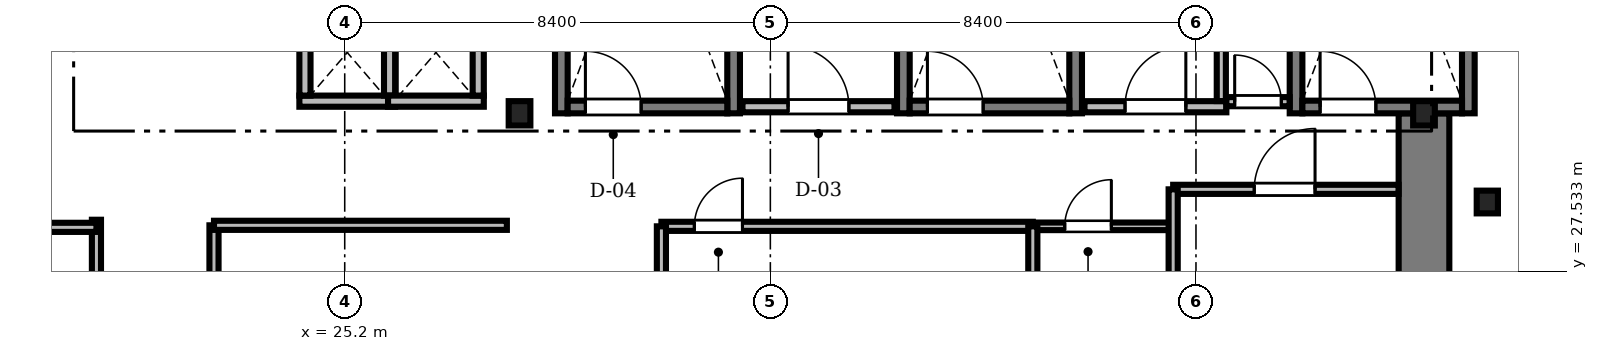
"""IFC4 building model, lengths in metres.
Left out: names, types, materials, properties, quantities, classifications, styles, units other than length and angle.
Written with IfcOpenShell. Run it as: python <this file> out.ifc"""

import sys

from ifc_helpers import new_model, si_unit, direction, frame, frame_2d, origin, origin_2d, place, context, subcontext, project, spatial, rectangle, i_section, extrude, source, transform, mapped, element, fill, save


model = new_model("IFC4")
c1 = context("Model", 3, precision=1e-05, world=origin(), true_north=direction((0.0, 1.0)))
c2 = subcontext(c1, "Body", "Model", "MODEL_VIEW")
j1 = project(units=[si_unit("LENGTHUNIT", "METRE"), si_unit("PLANEANGLEUNIT", "RADIAN")], contexts=[c1])
p1 = place(None, origin())
s1 = spatial("IfcSite", under=j1, at=p1, CompositionType="ELEMENT")
p2 = place(p1, origin())
s2 = spatial("IfcBuilding", under=s1, at=p2, CompositionType="ELEMENT")
p3 = place(p2, frame((0.0, 0.0, 71.4)))
s3 = spatial("IfcBuildingStorey", under=s2, at=p3, CompositionType="ELEMENT", Elevation=71.4)
m1 = source(origin(), c2, "Body", "SweptSolid", [
    extrude(rectangle(XDim=13.15, YDim=1.0, at=frame_2d((6.575, 0.0))), origin(), (0.0, 0.0, 1.0), 3.41),
])
p4 = place(p3, frame((46.5, 17.5, 0.0), z_axis=(0.0, 0.0, 1.0), x_axis=(0.0, 1.0, 0.0)))
e1 = element("IfcWall", 1, at=p4, inside=s3, PredefinedType="SHEAR", context=c2, shape_type="MappedRepresentation", body=[
    mapped(m1, transform((0.0, 0.0, 0.0), scale=1.0)),
])
m2 = source(origin(), c2, "Body", "SweptSolid", [
    extrude(i_section(OverallWidth=0.428, OverallDepth=0.481, WebThickness=0.04, FlangeThickness=0.063, FilletRadius=0.015, at=origin_2d()), origin(), (0.0, 0.0, 1.0), 3.41),
])
for number, where, z_axis, x_axis in (
    (2, (28.65, 30.65, 0.0), (0.0, 0.0, 1.0), (1.0, 0.0, 0.0)),
    (3, (46.5, 30.65, 0.0), (0.0, 0.0, 1.0), (1.0, 0.0, 0.0)),
):
    element("IfcColumn", number, at=place(p3, frame(where, z_axis=z_axis, x_axis=x_axis)), inside=s3, PredefinedType="COLUMN", context=c2, shape_type="MappedRepresentation", body=[
        mapped(m2, transform((0.0, 0.0, 0.0), scale=1.0)),
    ])
m3 = source(origin(), c2, "Body", "SweptSolid", [
    extrude(i_section(OverallWidth=0.419, OverallDepth=0.449, WebThickness=0.031, FlangeThickness=0.048, FilletRadius=0.015, at=origin_2d()), origin(), (0.0, 0.0, 1.0), 3.41),
])
p5 = place(p3, frame((47.75, 28.9, 0.0), z_axis=(0.0, 0.0, 1.0), x_axis=(1.0, 0.0, 0.0)))
e4 = element("IfcColumn", 4, at=p5, inside=s3, PredefinedType="COLUMN", context=c2, shape_type="MappedRepresentation", body=[
    mapped(m3, transform((0.0, 0.0, 0.0), scale=1.0)),
])
m4 = source(origin(), c2, "Body", "SweptSolid", [
    extrude(rectangle(XDim=9.15, YDim=0.25, at=frame_2d((4.575, 0.0))), origin(), (0.0, 0.0, 1.0), 3.45),
])
for number, where, z_axis, x_axis in (
    (5, (29.475, 30.65, 0.0), (0.0, 0.0, 1.0), (0.0, 1.0, 0.0)),
    (6, (32.875, 30.65, 0.0), (0.0, 0.0, 1.0), (0.0, 1.0, 0.0)),
):
    element("IfcWall", number, at=place(p3, frame(where, z_axis=z_axis, x_axis=x_axis)), inside=s3, PredefinedType="SOLIDWALL", context=c2, shape_type="MappedRepresentation", body=[
        mapped(m4, transform((0.0, 0.0, 0.0), scale=1.0)),
    ])
m5 = source(origin(), c2, "Body", "SweptSolid", [
    extrude(rectangle(XDim=3.15, YDim=0.25, at=frame_2d((1.575, 0.0))), origin(), (0.0, 0.0, 1.0), 3.45),
])
p6 = place(p3, frame((29.6, 30.775, 0.0), z_axis=(0.0, 0.0, 1.0), x_axis=(1.0, 0.0, 0.0)))
e7 = element("IfcWall", 7, at=p6, inside=s3, PredefinedType="SOLIDWALL", context=c2, shape_type="MappedRepresentation", body=[
    mapped(m5, transform((0.0, 0.0, 0.0), scale=1.0)),
])
m6 = source(origin(), c2, "Body", "SweptSolid", [
    extrude(rectangle(XDim=1.1, YDim=2.2, at=frame_2d((0.55, 1.1))), frame((0.0, 0.135, 0.0), z_axis=(0.0, -1.0, 0.0), x_axis=(1.0, 0.0, 0.0)), (0.0, 0.0, 1.0), 0.27),
])
p7 = place(p6, frame((0.35, 0.0, 0.0)))
e8 = element("IfcOpeningElement", 8, at=p7, cuts=e7, PredefinedType="OPENING", context=c2, shape_type="MappedRepresentation", body=[
    mapped(m6, transform((0.0, 0.0, 0.0), scale=1.0)),
])
for number, where, z_axis, x_axis in (
    (9, (36.225, 30.65, 0.0), (0.0, 0.0, 1.0), (0.0, 1.0, 0.0)),
    (10, (39.625, 30.65, 0.0), (0.0, 0.0, 1.0), (0.0, 1.0, 0.0)),
):
    element("IfcWall", number, at=place(p3, frame(where, z_axis=z_axis, x_axis=x_axis)), inside=s3, PredefinedType="SOLIDWALL", context=c2, shape_type="MappedRepresentation", body=[
        mapped(m4, transform((0.0, 0.0, 0.0), scale=1.0)),
    ])
p8 = place(p3, frame((36.35, 30.775, 0.0), z_axis=(0.0, 0.0, 1.0), x_axis=(1.0, 0.0, 0.0)))
e11 = element("IfcWall", 11, at=p8, inside=s3, PredefinedType="SOLIDWALL", context=c2, shape_type="MappedRepresentation", body=[
    mapped(m5, transform((0.0, 0.0, 0.0), scale=1.0)),
])
p9 = place(p8, frame((0.35, 0.0, 0.0)))
e12 = element("IfcOpeningElement", 12, at=p9, cuts=e11, PredefinedType="OPENING", context=c2, shape_type="MappedRepresentation", body=[
    mapped(m6, transform((0.0, 0.0, 0.0), scale=1.0)),
])
for number, where, z_axis, x_axis in (
    (13, (43.975, 30.65, 0.0), (0.0, 0.0, 1.0), (0.0, 1.0, 0.0)),
    (14, (47.375, 30.65, 0.0), (0.0, 0.0, 1.0), (0.0, 1.0, 0.0)),
):
    element("IfcWall", number, at=place(p3, frame(where, z_axis=z_axis, x_axis=x_axis)), inside=s3, PredefinedType="SOLIDWALL", context=c2, shape_type="MappedRepresentation", body=[
        mapped(m4, transform((0.0, 0.0, 0.0), scale=1.0)),
    ])
p10 = place(p3, frame((44.1, 30.775, 0.0), z_axis=(0.0, 0.0, 1.0), x_axis=(1.0, 0.0, 0.0)))
e15 = element("IfcWall", 15, at=p10, inside=s3, PredefinedType="SOLIDWALL", context=c2, shape_type="MappedRepresentation", body=[
    mapped(m5, transform((0.0, 0.0, 0.0), scale=1.0)),
])
p11 = place(p10, frame((0.35, 0.0, 0.0)))
e16 = element("IfcOpeningElement", 16, at=p11, cuts=e15, PredefinedType="OPENING", context=c2, shape_type="MappedRepresentation", body=[
    mapped(m6, transform((0.0, 0.0, 0.0), scale=1.0)),
])
m7 = source(origin(), c2, "Body", "SweptSolid", [
    extrude(rectangle(XDim=3.0, YDim=0.22, at=frame_2d((1.5, 0.0))), origin(), (0.0, 0.0, 1.0), 3.41),
])
p12 = place(p3, frame((33.05, 30.78, 0.0), z_axis=(0.0, 0.0, 1.0), x_axis=(1.0, 0.0, 0.0)))
e17 = element("IfcWall", 17, at=p12, inside=s3, PredefinedType="SOLIDWALL", context=c2, shape_type="MappedRepresentation", body=[
    mapped(m7, transform((0.0, 0.0, 0.0), scale=1.0)),
])
m8 = source(origin(), c2, "Body", "SweptSolid", [
    extrude(rectangle(XDim=1.2, YDim=2.2, at=frame_2d((0.6, 1.1))), frame((0.0, 0.12, 0.0), z_axis=(0.0, -1.0, 0.0), x_axis=(1.0, 0.0, 0.0)), (0.0, 0.0, 1.0), 0.24),
])
p13 = place(p12, frame((0.9, 0.0, 0.0)))
e18 = element("IfcOpeningElement", 18, at=p13, cuts=e17, PredefinedType="OPENING", context=c2, shape_type="MappedRepresentation", body=[
    mapped(m8, transform((0.0, 0.0, 0.0), scale=1.0)),
])
m9 = source(origin(), c2, "Body", "SweptSolid", [
    extrude(rectangle(XDim=2.8, YDim=0.22, at=frame_2d((1.4, 0.0))), origin(), (0.0, 0.0, 1.0), 3.41),
])
p14 = place(p3, frame((39.8, 30.78, 0.0), z_axis=(0.0, 0.0, 1.0), x_axis=(1.0, 0.0, 0.0)))
e19 = element("IfcWall", 19, at=p14, inside=s3, PredefinedType="SOLIDWALL", context=c2, shape_type="MappedRepresentation", body=[
    mapped(m9, transform((0.0, 0.0, 0.0), scale=1.0)),
])
p15 = place(p14, frame((0.8, 0.0, 0.0)))
e20 = element("IfcOpeningElement", 20, at=p15, cuts=e19, PredefinedType="OPENING", context=c2, shape_type="MappedRepresentation", body=[
    mapped(m8, transform((0.0, 0.0, 0.0), scale=1.0)),
])
m10 = source(origin(), c2, "Body", "SweptSolid", [
    extrude(rectangle(XDim=1.89, YDim=0.22, at=frame_2d((0.945, 0.0))), origin(), (0.0, 0.0, 1.0), 3.41),
])
p16 = place(p3, frame((24.305, 30.89, 0.0), z_axis=(0.0, 0.0, 1.0), x_axis=(1.0, 0.0, 0.0)))
e21 = element("IfcWall", 21, at=p16, inside=s3, PredefinedType="SOLIDWALL", context=c2, shape_type="MappedRepresentation", body=[
    mapped(m10, transform((0.0, 0.0, 0.0), scale=1.0)),
])
m11 = source(origin(), c2, "Body", "SweptSolid", [
    extrude(rectangle(XDim=1.7, YDim=0.22, at=frame_2d((0.85, 0.0))), origin(), (0.0, 0.0, 1.0), 3.41),
])
for number, where, z_axis, x_axis in (
    (22, (24.415, 31.0, 0.0), (0.0, 0.0, 1.0), (0.0, 1.0, 0.0)),
    (23, (26.085, 31.0, 0.0), (0.0, 0.0, 1.0), (0.0, 1.0, 0.0)),
):
    element("IfcWall", number, at=place(p3, frame(where, z_axis=z_axis, x_axis=x_axis)), inside=s3, PredefinedType="SOLIDWALL", context=c2, shape_type="MappedRepresentation", body=[
        mapped(m11, transform((0.0, 0.0, 0.0), scale=1.0)),
    ])
p17 = place(p3, frame((26.055, 30.89, 0.0), z_axis=(0.0, 0.0, 1.0), x_axis=(1.0, 0.0, 0.0)))
e24 = element("IfcWall", 24, at=p17, inside=s3, PredefinedType="SOLIDWALL", context=c2, shape_type="MappedRepresentation", body=[
    mapped(m10, transform((0.0, 0.0, 0.0), scale=1.0)),
])
p18 = place(p3, frame((27.835, 31.0, 0.0), z_axis=(0.0, 0.0, 1.0), x_axis=(0.0, 1.0, 0.0)))
e25 = element("IfcWall", 25, at=p18, inside=s3, PredefinedType="SOLIDWALL", context=c2, shape_type="MappedRepresentation", body=[
    mapped(m11, transform((0.0, 0.0, 0.0), scale=1.0)),
])
m12 = source(origin(), c2, "Body", "SweptSolid", [
    extrude(rectangle(XDim=13.84, YDim=0.18, at=frame_2d((6.92, 0.0))), origin(), (0.0, 0.0, 1.0), 2.802),
])
p19 = place(p3, frame((20.3, 14.71, 0.0), z_axis=(0.0, 0.0, 1.0), x_axis=(0.0, 1.0, 0.0)))
e26 = element("IfcWall", 26, at=p19, inside=s3, PredefinedType="PARTITIONING", context=c2, shape_type="MappedRepresentation", body=[
    mapped(m12, transform((0.0, 0.0, 0.0), scale=1.0)),
])
m13 = source(origin(), c2, "Body", "SweptSolid", [
    extrude(rectangle(XDim=1.05, YDim=2.2, at=frame_2d((0.525, 1.1))), frame((0.0, 0.1, 0.0), z_axis=(0.0, -1.0, 0.0), x_axis=(1.0, 0.0, 0.0)), (0.0, 0.0, 1.0), 0.2),
])
p20 = place(p19, frame((2.903, 0.0, 0.0)))
e27 = element("IfcOpeningElement", 27, at=p20, cuts=e26, PredefinedType="OPENING", context=c2, shape_type="MappedRepresentation", body=[
    mapped(m13, transform((0.0, 0.0, 0.0), scale=1.0)),
])
p21 = place(p19, frame((9.748, 0.0, 0.0)))
e28 = element("IfcOpeningElement", 28, at=p21, cuts=e26, PredefinedType="OPENING", context=c2, shape_type="MappedRepresentation", body=[
    mapped(m13, transform((0.0, 0.0, 0.0), scale=1.0)),
])
m14 = source(origin(), c2, "Body", "SweptSolid", [
    extrude(rectangle(XDim=11.94, YDim=0.18, at=frame_2d((5.97, 0.0))), origin(), (0.0, 0.0, 1.0), 2.802),
])
p22 = place(p3, frame((22.62, 16.5, 0.0), z_axis=(0.0, 0.0, 1.0), x_axis=(0.0, 1.0, 0.0)))
e29 = element("IfcWall", 29, at=p22, inside=s3, PredefinedType="PARTITIONING", context=c2, shape_type="MappedRepresentation", body=[
    mapped(m14, transform((0.0, 0.0, 0.0), scale=1.0)),
])
p23 = place(p22, frame((4.5, 0.0, 0.0)))
e30 = element("IfcOpeningElement", 30, at=p23, cuts=e29, PredefinedType="OPENING", context=c2, shape_type="MappedRepresentation", body=[
    mapped(m13, transform((0.0, 0.0, 0.0), scale=1.0)),
])
m15 = source(origin(), c2, "Body", "SweptSolid", [
    extrude(rectangle(XDim=7.33, YDim=0.18, at=frame_2d((3.665, 0.0))), origin(), (0.0, 0.0, 1.0), 3.042),
])
p24 = place(p3, frame((31.45, 28.42, 0.0), z_axis=(0.0, 0.0, 1.0), x_axis=(1.0, 0.0, 0.0)))
e31 = element("IfcWall", 31, at=p24, inside=s3, PredefinedType="PARTITIONING", context=c2, shape_type="MappedRepresentation", body=[
    mapped(m15, transform((0.0, 0.0, 0.0), scale=1.0)),
])
m16 = source(origin(), c2, "Body", "SweptSolid", [
    extrude(rectangle(XDim=0.95, YDim=2.15, at=frame_2d((0.475, 1.075))), frame((0.0, 0.1, 0.0), z_axis=(0.0, -1.0, 0.0), x_axis=(1.0, 0.0, 0.0)), (0.0, 0.0, 1.0), 0.2),
])
p25 = place(p24, frame((0.65, 0.0, 0.0)))
e32 = element("IfcOpeningElement", 32, at=p25, cuts=e31, PredefinedType="OPENING", context=c2, shape_type="MappedRepresentation", body=[
    mapped(m16, transform((0.0, 0.0, 0.0), scale=1.0)),
])
m17 = source(origin(), c2, "Body", "SweptSolid", [
    extrude(rectangle(XDim=4.448, YDim=0.18, at=frame_2d((2.224, 0.0))), origin(), (0.0, 0.0, 1.0), 3.042),
])
p26 = place(p3, frame((41.55, 29.15, 0.0), z_axis=(0.0, 0.0, 1.0), x_axis=(1.0, 0.0, 0.0)))
e33 = element("IfcWall", 33, at=p26, inside=s3, PredefinedType="PARTITIONING", context=c2, shape_type="MappedRepresentation", body=[
    mapped(m17, transform((0.0, 0.0, 0.0), scale=1.0)),
])
m18 = source(origin(), c2, "Body", "SweptSolid", [
    extrude(rectangle(XDim=1.2, YDim=2.2, at=frame_2d((0.6, 1.1))), frame((0.0, 0.1, 0.0), z_axis=(0.0, -1.0, 0.0), x_axis=(1.0, 0.0, 0.0)), (0.0, 0.0, 1.0), 0.2),
])
p27 = place(p26, frame((1.6, 0.0, 0.0)))
e34 = element("IfcOpeningElement", 34, at=p27, cuts=e33, PredefinedType="OPENING", context=c2, shape_type="MappedRepresentation", body=[
    mapped(m18, transform((0.0, 0.0, 0.0), scale=1.0)),
])
m19 = source(origin(), c2, "Body", "SweptSolid", [
    extrude(rectangle(XDim=2.74, YDim=0.15, at=frame_2d((1.37, 0.0))), origin(), (0.0, 0.0, 1.0), 3.41),
])
p28 = place(p3, frame((38.78, 28.42, 0.0), z_axis=(0.0, 0.0, 1.0), x_axis=(1.0, 0.0, 0.0)))
e35 = element("IfcWall", 35, at=p28, inside=s3, PredefinedType="PARTITIONING", context=c2, shape_type="MappedRepresentation", body=[
    mapped(m19, transform((0.0, 0.0, 0.0), scale=1.0)),
])
m20 = source(origin(), c2, "Body", "SweptSolid", [
    extrude(rectangle(XDim=0.92, YDim=2.1, at=frame_2d((0.46, 1.05))), frame((0.0, 0.085, 0.0), z_axis=(0.0, -1.0, 0.0), x_axis=(1.0, 0.0, 0.0)), (0.0, 0.0, 1.0), 0.17),
])
p29 = place(p28, frame((0.63, 0.0, 0.0)))
e36 = element("IfcOpeningElement", 36, at=p29, cuts=e35, PredefinedType="OPENING", context=c2, shape_type="MappedRepresentation", body=[
    mapped(m20, transform((0.0, 0.0, 0.0), scale=1.0)),
])
m21 = source(origin(), c2, "Body", "SweptSolid", [
    extrude(rectangle(XDim=1.248, YDim=0.18, at=frame_2d((0.624, 0.0))), origin(), (0.0, 0.0, 1.0), 3.41),
])
p30 = place(p3, frame((42.6, 30.88, 0.0), z_axis=(0.0, 0.0, 1.0), x_axis=(1.0, 0.0, 0.0)))
e37 = element("IfcWall", 37, at=p30, inside=s3, PredefinedType="PARTITIONING", context=c2, shape_type="MappedRepresentation", body=[
    mapped(m21, transform((0.0, 0.0, 0.0), scale=1.0)),
])
m22 = source(origin(), c2, "Body", "SweptSolid", [
    extrude(rectangle(XDim=0.92, YDim=2.1, at=frame_2d((0.46, 1.05))), frame((0.0, 0.1, 0.0), z_axis=(0.0, -1.0, 0.0), x_axis=(1.0, 0.0, 0.0)), (0.0, 0.0, 1.0), 0.2),
])
p31 = place(p30, frame((0.164, 0.0, 0.0)))
e38 = element("IfcOpeningElement", 38, at=p31, cuts=e37, PredefinedType="OPENING", context=c2, shape_type="MappedRepresentation", body=[
    mapped(m22, transform((0.0, 0.0, 0.0), scale=1.0)),
])
m23 = source(origin(), c2, "Body", "SweptSolid", [
    extrude(rectangle(XDim=18.07, YDim=0.18, at=frame_2d((9.035, 0.0))), origin(), (0.0, 0.0, 1.0), 2.652),
])
p32 = place(p3, frame((2.23, 28.4, 0.0), z_axis=(0.0, 0.0, 1.0), x_axis=(1.0, 0.0, 0.0)))
e39 = element("IfcWall", 39, at=p32, inside=s3, PredefinedType="PARTITIONING", context=c2, shape_type="MappedRepresentation", body=[
    mapped(m23, transform((0.0, 0.0, 0.0), scale=1.0)),
])
m24 = source(origin(), c2, "Body", "SweptSolid", [
    extrude(rectangle(XDim=5.78, YDim=0.18, at=frame_2d((2.89, 0.0))), origin(), (0.0, 0.0, 1.0), 3.41),
])
p33 = place(p3, frame((22.62, 28.44, 0.0), z_axis=(0.0, 0.0, 1.0), x_axis=(1.0, 0.0, 0.0)))
e40 = element("IfcWall", 40, at=p33, inside=s3, PredefinedType="PARTITIONING", context=c2, shape_type="MappedRepresentation", body=[
    mapped(m24, transform((0.0, 0.0, 0.0), scale=1.0)),
])
m25 = source(origin(), c2, "Body", "SweptSolid", [
    extrude(rectangle(XDim=2.758, YDim=0.18, at=frame_2d((1.379, 0.0))), origin(), (0.0, 0.0, 1.0), 3.41),
])
p34 = place(p3, frame((42.5, 30.892, 0.0), z_axis=(0.0, 0.0, 1.0), x_axis=(0.0, 1.0, 0.0)))
e41 = element("IfcWall", 41, at=p34, inside=s3, PredefinedType="PARTITIONING", context=c2, shape_type="MappedRepresentation", body=[
    mapped(m25, transform((0.0, 0.0, 0.0), scale=1.0)),
])
m26 = source(origin(), c2, "Body", "SweptSolid", [
    extrude(rectangle(XDim=2.35, YDim=0.18, at=frame_2d((1.175, 0.0))), origin(), (0.0, 0.0, 1.0), 2.802),
])
p35 = place(p3, frame((41.55, 26.8, 0.0), z_axis=(0.0, 0.0, 1.0), x_axis=(0.0, 1.0, 0.0)))
e42 = element("IfcWall", 42, at=p35, inside=s3, PredefinedType="PARTITIONING", context=c2, shape_type="MappedRepresentation", body=[
    mapped(m26, transform((0.0, 0.0, 0.0), scale=1.0)),
])
m27 = source(origin(), c2, "Body", "SweptSolid", [
    extrude(rectangle(XDim=1.6, YDim=0.18, at=frame_2d((0.8, 0.0))), origin(), (0.0, 0.0, 1.0), 2.952),
])
for number, where, z_axis, x_axis in (
    (43, (31.45, 26.82, 0.0), (0.0, 0.0, 1.0), (0.0, 1.0, 0.0)),
    (44, (38.78, 26.82, 0.0), (0.0, 0.0, 1.0), (0.0, 1.0, 0.0)),
):
    element("IfcWall", number, at=place(p3, frame(where, z_axis=z_axis, x_axis=x_axis)), inside=s3, PredefinedType="PARTITIONING", context=c2, shape_type="MappedRepresentation", body=[
        mapped(m27, transform((0.0, 0.0, 0.0), scale=1.0)),
    ])
m28 = source(origin(), c2, "Body", "SweptSolid", [
    extrude(rectangle(XDim=1.1, YDim=2.2, at=frame_2d((0.55, 1.1))), frame((0.0, 0.025, 0.0), z_axis=(0.0, -1.0, 0.0), x_axis=(1.0, 0.0, 0.0)), (0.0, 0.0, 1.0), 0.05),
])
p36 = place(p7, origin())
e45 = element("IfcDoor", 45, at=p36, inside=s3, OperationType="SINGLE_SWING_LEFT", PredefinedType="DOOR", context=c2, shape_type="MappedRepresentation", body=[
    mapped(m28, transform((0.0, 0.0, 0.0), scale=1.0)),
])
fill(e8, e45)
p37 = place(p9, origin())
e46 = element("IfcDoor", 46, at=p37, inside=s3, OperationType="SINGLE_SWING_LEFT", PredefinedType="DOOR", context=c2, shape_type="MappedRepresentation", body=[
    mapped(m28, transform((0.0, 0.0, 0.0), scale=1.0)),
])
fill(e12, e46)
p38 = place(p11, origin())
e47 = element("IfcDoor", 47, at=p38, inside=s3, OperationType="SINGLE_SWING_LEFT", PredefinedType="DOOR", context=c2, shape_type="MappedRepresentation", body=[
    mapped(m28, transform((0.0, 0.0, 0.0), scale=1.0)),
])
fill(e16, e47)
m29 = source(origin(), c2, "Body", "SweptSolid", [
    extrude(rectangle(XDim=1.2, YDim=2.2, at=frame_2d((0.6, 1.1))), frame((0.0, 0.025, 0.0), z_axis=(0.0, -1.0, 0.0), x_axis=(1.0, 0.0, 0.0)), (0.0, 0.0, 1.0), 0.05),
])
p39 = place(p13, origin())
e48 = element("IfcDoor", 48, at=p39, inside=s3, OperationType="SINGLE_SWING_LEFT", PredefinedType="DOOR", context=c2, shape_type="MappedRepresentation", body=[
    mapped(m29, transform((0.0, 0.0, 0.0), scale=1.0)),
])
fill(e18, e48)
p40 = place(p15, origin())
e49 = element("IfcDoor", 49, at=p40, inside=s3, OperationType="SINGLE_SWING_RIGHT", PredefinedType="DOOR", context=c2, shape_type="MappedRepresentation", body=[
    mapped(m29, transform((0.0, 0.0, 0.0), scale=1.0)),
])
fill(e20, e49)
m30 = source(origin(), c2, "Body", "SweptSolid", [
    extrude(rectangle(XDim=0.95, YDim=2.15, at=frame_2d((0.475, 1.075))), frame((0.0, 0.025, 0.0), z_axis=(0.0, -1.0, 0.0), x_axis=(1.0, 0.0, 0.0)), (0.0, 0.0, 1.0), 0.05),
])
p41 = place(p25, origin())
e50 = element("IfcDoor", 50, at=p41, inside=s3, OperationType="SINGLE_SWING_RIGHT", PredefinedType="DOOR", context=c2, shape_type="MappedRepresentation", body=[
    mapped(m30, transform((0.0, 0.0, 0.0), scale=1.0)),
])
fill(e32, e50)
p42 = place(p27, origin())
e51 = element("IfcDoor", 51, at=p42, inside=s3, OperationType="SINGLE_SWING_RIGHT", PredefinedType="DOOR", context=c2, shape_type="MappedRepresentation", body=[
    mapped(m29, transform((0.0, 0.0, 0.0), scale=1.0)),
])
fill(e34, e51)
m31 = source(origin(), c2, "Body", "SweptSolid", [
    extrude(rectangle(XDim=0.92, YDim=2.1, at=frame_2d((0.46, 1.05))), frame((0.0, 0.025, 0.0), z_axis=(0.0, -1.0, 0.0), x_axis=(1.0, 0.0, 0.0)), (0.0, 0.0, 1.0), 0.05),
])
p43 = place(p29, origin())
e52 = element("IfcDoor", 52, at=p43, inside=s3, OperationType="SINGLE_SWING_RIGHT", PredefinedType="DOOR", context=c2, shape_type="MappedRepresentation", body=[
    mapped(m31, transform((0.0, 0.0, 0.0), scale=1.0)),
])
fill(e36, e52)
p44 = place(p31, origin())
e53 = element("IfcDoor", 53, at=p44, inside=s3, OperationType="SINGLE_SWING_LEFT", PredefinedType="DOOR", context=c2, shape_type="MappedRepresentation", body=[
    mapped(m31, transform((0.0, 0.0, 0.0), scale=1.0)),
])
fill(e38, e53)
save(model, sys.argv[1])
